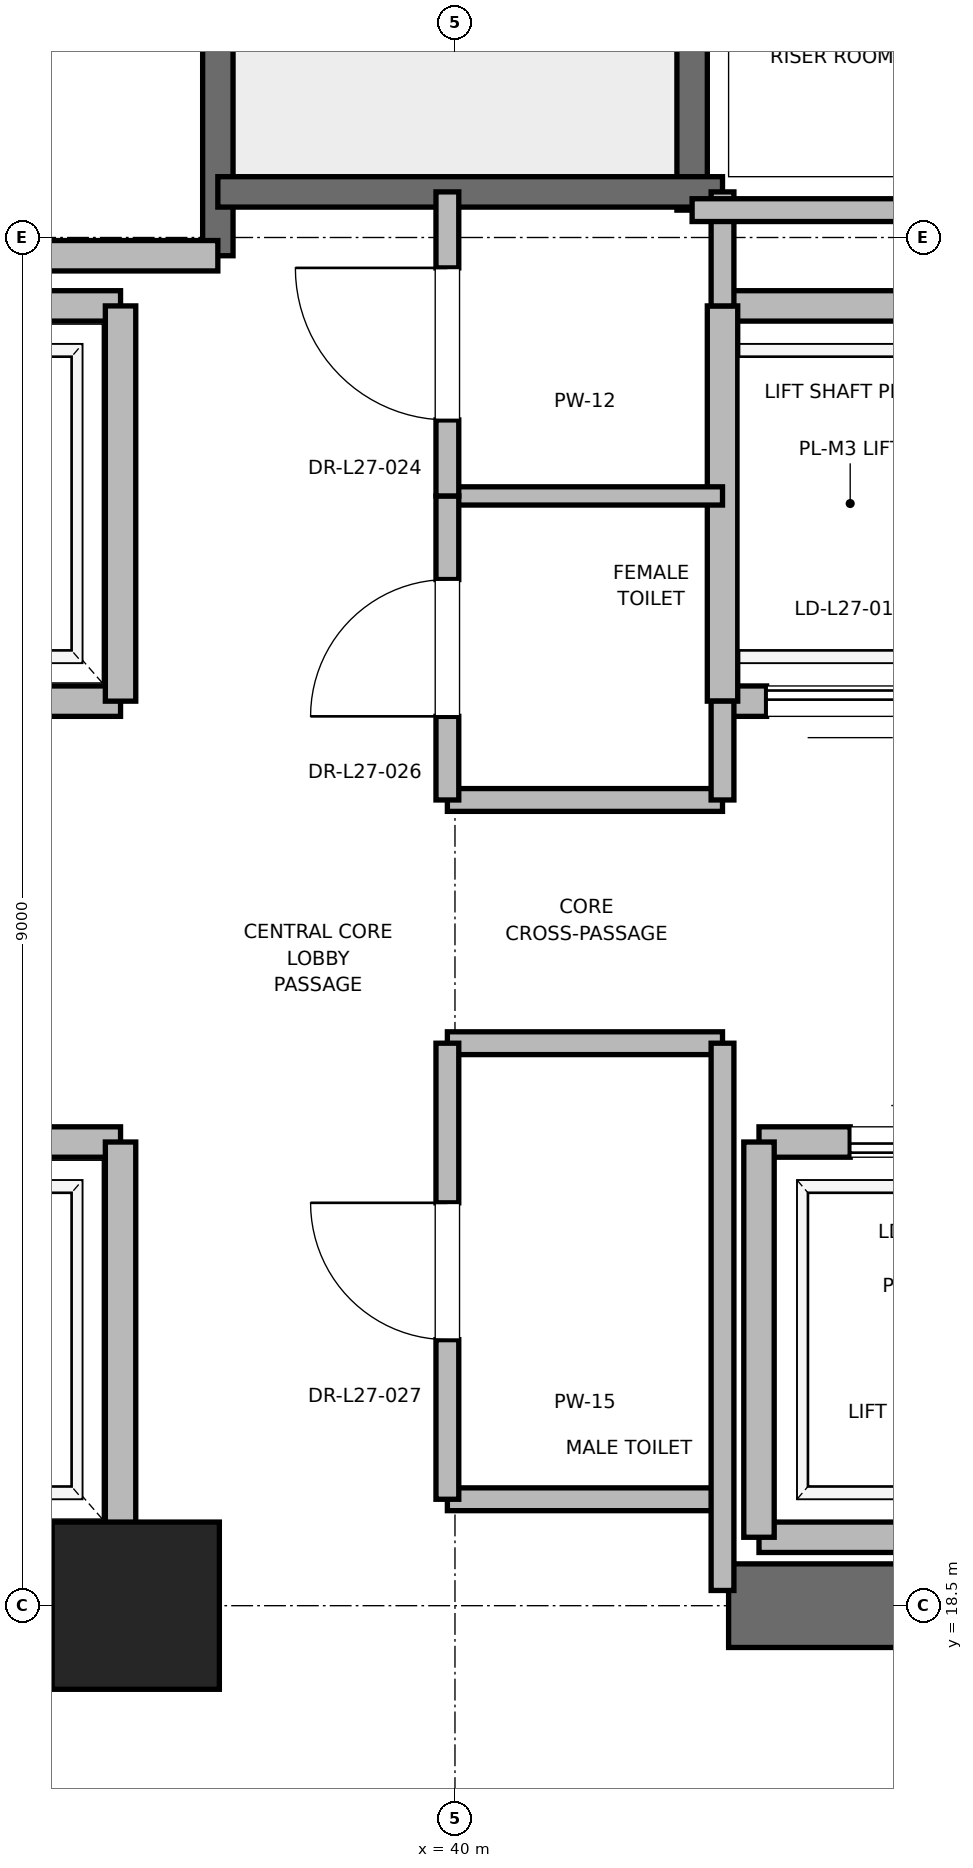
"""IFC4 building model, lengths in metres.
Left out: names, types, materials, properties, quantities, classifications, styles, units other than length and angle.
Written with IfcOpenShell. Run it as: python <this file> out.ifc"""

import sys

from ifc_helpers import new_model, si_unit, direction, frame, frame_2d, origin, origin_2d, place, context, subcontext, project, spatial, rectangle, extrude, element, fill, save


model = new_model("IFC4")
c1 = context("Model", 3, precision=1e-05, world=origin(), true_north=direction((0.0, 1.0)))
c2 = subcontext(c1, "Body", "Model", "MODEL_VIEW")
j1 = project(units=[si_unit("LENGTHUNIT", "METRE"), si_unit("PLANEANGLEUNIT", "RADIAN")], contexts=[c1])
p1 = place(None, origin())
s1 = spatial("IfcSite", under=j1, at=p1, CompositionType="ELEMENT")
p2 = place(p1, origin())
s2 = spatial("IfcBuilding", under=s1, at=p2, CompositionType="ELEMENT")
p3 = place(p2, frame((0.0, 0.0, 118.4)))
s3 = spatial("IfcBuildingStorey", under=s2, at=p3, CompositionType="ELEMENT", Elevation=118.4)
p4 = place(p3, frame((37.9, 18.5, 0.0), z_axis=(0.0, 0.0, 1.0), x_axis=(1.0, 0.0, 0.0)))
e1 = element("IfcColumn", 1, at=p4, inside=s3, PredefinedType="PILASTER", context=c2, shape_type="SweptSolid", body=[
    extrude(rectangle(XDim=1.1, YDim=1.1, at=origin_2d()), origin(), (0.0, 0.0, 1.0), 5.0),
])
for number, where, z_axis, x_axis in (
    (2, (29.0, 18.5, 0.0), (0.0, 0.0, 1.0), (1.0, 0.0, 0.0)),
    (3, (41.8, 18.5, 0.0), (0.0, 0.0, 1.0), (1.0, 0.0, 0.0)),
):
    element("IfcWall", number, at=place(p3, frame(where, z_axis=z_axis, x_axis=x_axis)), inside=s3, PredefinedType="SHEAR", context=c2, shape_type="SweptSolid", body=[
        extrude(rectangle(XDim=9.2, YDim=0.55, at=frame_2d((4.6, 0.0))), origin(), (0.0, 0.0, 1.0), 4.7),
    ])
p5 = place(p3, frame((38.44, 27.38, 0.0), z_axis=(0.0, 0.0, 1.0), x_axis=(0.0, 1.0, 0.0)))
e4 = element("IfcWall", 4, at=p5, inside=s3, PredefinedType="SOLIDWALL", context=c2, shape_type="SweptSolid", body=[
    extrude(rectangle(XDim=8.87, YDim=0.2, at=frame_2d((4.435, 0.0))), origin(), (0.0, 0.0, 1.0), 4.7),
])
p6 = place(p3, frame((41.56, 27.68, 0.0), z_axis=(0.0, 0.0, 1.0), x_axis=(0.0, 1.0, 0.0)))
e5 = element("IfcWall", 5, at=p6, inside=s3, PredefinedType="SOLIDWALL", context=c2, shape_type="SweptSolid", body=[
    extrude(rectangle(XDim=8.57, YDim=0.2, at=frame_2d((4.285, 0.0))), origin(), (0.0, 0.0, 1.0), 4.7),
])
p7 = place(p3, frame((38.44, 27.8, 0.0), z_axis=(0.0, 0.0, 1.0), x_axis=(1.0, 0.0, 0.0)))
e6 = element("IfcWall", 6, at=p7, inside=s3, PredefinedType="SOLIDWALL", context=c2, shape_type="SweptSolid", body=[
    extrude(rectangle(XDim=3.32, YDim=0.2, at=frame_2d((1.66, 0.0))), origin(), (0.0, 0.0, 1.0), 4.7),
])
p8 = place(p3, frame((32.82, 27.38, 0.0), z_axis=(0.0, 0.0, 1.0), x_axis=(1.0, 0.0, 0.0)))
e7 = element("IfcWall", 7, at=p8, inside=s3, PredefinedType="PARTITIONING", context=c2, shape_type="SweptSolid", body=[
    extrude(rectangle(XDim=5.62, YDim=0.2, at=frame_2d((2.81, 0.0))), origin(), (0.0, 0.0, 1.0), 4.7),
])
p9 = place(p3, frame((35.5, 18.95, 0.0), z_axis=(0.0, 0.0, 1.0), x_axis=(1.0, 0.0, 0.0)))
e8 = element("IfcWall", 8, at=p9, inside=s3, PredefinedType="SOLIDWALL", context=c2, shape_type="SweptSolid", body=[
    extrude(rectangle(XDim=2.3, YDim=0.2, at=frame_2d((1.15, 0.0))), origin(), (0.0, 0.0, 1.0), 3.68),
])
p10 = place(p3, frame((37.8, 21.55, 0.0), z_axis=(0.0, 0.0, 1.0), x_axis=(-1.0, 0.0, 0.0)))
e9 = element("IfcWall", 9, at=p10, inside=s3, PredefinedType="SOLIDWALL", context=c2, shape_type="SweptSolid", body=[
    extrude(rectangle(XDim=2.3, YDim=0.2, at=frame_2d((1.15, 0.0))), origin(), (0.0, 0.0, 1.0), 4.7),
])
p11 = place(p10, frame((0.6, 0.0, 0.0)))
e10 = element("IfcOpeningElement", 10, at=p11, cuts=e9, PredefinedType="OPENING", context=c2, shape_type="SweptSolid", body=[
    extrude(rectangle(XDim=1.1, YDim=2.2, at=frame_2d((0.55, 1.1))), frame((0.0, 0.1, 0.0), z_axis=(0.0, -1.0, 0.0), x_axis=(1.0, 0.0, 0.0)), (0.0, 0.0, 1.0), 0.2),
])
p12 = place(p3, frame((37.8, 18.95, 0.0), z_axis=(0.0, 0.0, 1.0), x_axis=(0.0, 1.0, 0.0)))
e11 = element("IfcWall", 11, at=p12, inside=s3, PredefinedType="SOLIDWALL", context=c2, shape_type="SweptSolid", body=[
    extrude(rectangle(XDim=2.6, YDim=0.2, at=frame_2d((1.3, 0.0))), origin(), (0.0, 0.0, 1.0), 3.68),
])
p13 = place(p3, frame((35.5, 24.45, 0.0), z_axis=(0.0, 0.0, 1.0), x_axis=(1.0, 0.0, 0.0)))
e12 = element("IfcWall", 12, at=p13, inside=s3, PredefinedType="SOLIDWALL", context=c2, shape_type="SweptSolid", body=[
    extrude(rectangle(XDim=2.3, YDim=0.2, at=frame_2d((1.15, 0.0))), origin(), (0.0, 0.0, 1.0), 4.7),
])
p14 = place(p13, frame((0.6, 0.0, 0.0)))
e13 = element("IfcOpeningElement", 13, at=p14, cuts=e12, PredefinedType="OPENING", context=c2, shape_type="SweptSolid", body=[
    extrude(rectangle(XDim=1.1, YDim=2.2, at=frame_2d((0.55, 1.1))), frame((0.0, 0.1, 0.0), z_axis=(0.0, -1.0, 0.0), x_axis=(1.0, 0.0, 0.0)), (0.0, 0.0, 1.0), 0.2),
])
p15 = place(p3, frame((37.8, 27.05, 0.0), z_axis=(0.0, 0.0, 1.0), x_axis=(-1.0, 0.0, 0.0)))
e14 = element("IfcWall", 14, at=p15, inside=s3, PredefinedType="SOLIDWALL", context=c2, shape_type="SweptSolid", body=[
    extrude(rectangle(XDim=2.3, YDim=0.2, at=frame_2d((1.15, 0.0))), origin(), (0.0, 0.0, 1.0), 4.7),
])
p16 = place(p3, frame((37.8, 24.45, 0.0), z_axis=(0.0, 0.0, 1.0), x_axis=(0.0, 1.0, 0.0)))
e15 = element("IfcWall", 15, at=p16, inside=s3, PredefinedType="SOLIDWALL", context=c2, shape_type="SweptSolid", body=[
    extrude(rectangle(XDim=2.6, YDim=0.2, at=frame_2d((1.3, 0.0))), origin(), (0.0, 0.0, 1.0), 4.7),
])
p17 = place(p3, frame((42.0, 18.95, 0.0), z_axis=(0.0, 0.0, 1.0), x_axis=(1.0, 0.0, 0.0)))
e16 = element("IfcWall", 16, at=p17, inside=s3, PredefinedType="SOLIDWALL", context=c2, shape_type="SweptSolid", body=[
    extrude(rectangle(XDim=2.3, YDim=0.2, at=frame_2d((1.15, 0.0))), origin(), (0.0, 0.0, 1.0), 3.68),
])
p18 = place(p3, frame((44.3, 21.55, 0.0), z_axis=(0.0, 0.0, 1.0), x_axis=(-1.0, 0.0, 0.0)))
e17 = element("IfcWall", 17, at=p18, inside=s3, PredefinedType="SOLIDWALL", context=c2, shape_type="SweptSolid", body=[
    extrude(rectangle(XDim=2.3, YDim=0.2, at=frame_2d((1.15, 0.0))), origin(), (0.0, 0.0, 1.0), 4.7),
])
p19 = place(p18, frame((0.6, 0.0, 0.0)))
e18 = element("IfcOpeningElement", 18, at=p19, cuts=e17, PredefinedType="OPENING", context=c2, shape_type="SweptSolid", body=[
    extrude(rectangle(XDim=1.1, YDim=2.2, at=frame_2d((0.55, 1.1))), frame((0.0, 0.1, 0.0), z_axis=(0.0, -1.0, 0.0), x_axis=(1.0, 0.0, 0.0)), (0.0, 0.0, 1.0), 0.2),
])
p20 = place(p3, frame((42.0, 21.55, 0.0), z_axis=(0.0, 0.0, 1.0), x_axis=(0.0, -1.0, 0.0)))
e19 = element("IfcWall", 19, at=p20, inside=s3, PredefinedType="SOLIDWALL", context=c2, shape_type="SweptSolid", body=[
    extrude(rectangle(XDim=2.6, YDim=0.2, at=frame_2d((1.3, 0.0))), origin(), (0.0, 0.0, 1.0), 3.68),
])
p21 = place(p3, frame((41.76, 24.45, 0.0), z_axis=(0.0, 0.0, 1.0), x_axis=(1.0, 0.0, 0.0)))
e20 = element("IfcWall", 20, at=p21, inside=s3, PredefinedType="SOLIDWALL", context=c2, shape_type="SweptSolid", body=[
    extrude(rectangle(XDim=1.68, YDim=0.2, at=frame_2d((0.84, 0.0))), origin(), (0.0, 0.0, 1.0), 4.7),
])
p22 = place(p21, frame((0.29, 0.0, 0.0)))
e21 = element("IfcOpeningElement", 21, at=p22, cuts=e20, PredefinedType="OPENING", context=c2, shape_type="SweptSolid", body=[
    extrude(rectangle(XDim=1.1, YDim=2.2, at=frame_2d((0.55, 1.1))), frame((0.0, 0.1, 0.0), z_axis=(0.0, -1.0, 0.0), x_axis=(1.0, 0.0, 0.0)), (0.0, 0.0, 1.0), 0.2),
])
p23 = place(p3, frame((43.44, 27.05, 0.0), z_axis=(0.0, 0.0, 1.0), x_axis=(-1.0, 0.0, 0.0)))
e22 = element("IfcWall", 22, at=p23, inside=s3, PredefinedType="SOLIDWALL", context=c2, shape_type="SweptSolid", body=[
    extrude(rectangle(XDim=1.68, YDim=0.2, at=frame_2d((0.84, 0.0))), origin(), (0.0, 0.0, 1.0), 4.7),
])
p24 = place(p3, frame((41.76, 27.05, 0.0), z_axis=(0.0, 0.0, 1.0), x_axis=(0.0, -1.0, 0.0)))
e23 = element("IfcWall", 23, at=p24, inside=s3, PredefinedType="SOLIDWALL", context=c2, shape_type="SweptSolid", body=[
    extrude(rectangle(XDim=2.6, YDim=0.2, at=frame_2d((1.3, 0.0))), origin(), (0.0, 0.0, 1.0), 4.7),
])
for number, where, z_axis, x_axis in (
    (24, (39.95, 19.2, 0.0), (0.0, 0.0, 1.0), (1.0, 0.0, 0.0)),
    (25, (39.95, 22.2, 0.0), (0.0, 0.0, 1.0), (1.0, 0.0, 0.0)),
    (26, (39.95, 23.8, 0.0), (0.0, 0.0, 1.0), (1.0, 0.0, 0.0)),
):
    element("IfcWall", number, at=place(p3, frame(where, z_axis=z_axis, x_axis=x_axis)), inside=s3, PredefinedType="PARTITIONING", context=c2, shape_type="SweptSolid", body=[
        extrude(rectangle(XDim=1.81, YDim=0.15, at=frame_2d((0.905, 0.0))), origin(), (0.0, 0.0, 1.0), 2.85),
    ])
p25 = place(p3, frame((39.95, 25.8, 0.0), z_axis=(0.0, 0.0, 1.0), x_axis=(1.0, 0.0, 0.0)))
e27 = element("IfcWall", 27, at=p25, inside=s3, PredefinedType="PARTITIONING", context=c2, shape_type="SweptSolid", body=[
    extrude(rectangle(XDim=1.81, YDim=0.12, at=frame_2d((0.905, 0.0))), origin(), (0.0, 0.0, 1.0), 2.85),
])
p26 = place(p3, frame((41.76, 18.6, 0.0), z_axis=(0.0, 0.0, 1.0), x_axis=(0.0, 1.0, 0.0)))
e28 = element("IfcWall", 28, at=p26, inside=s3, PredefinedType="PARTITIONING", context=c2, shape_type="SweptSolid", body=[
    extrude(rectangle(XDim=3.6, YDim=0.15, at=frame_2d((1.8, 0.0))), origin(), (0.0, 0.0, 1.0), 2.85),
])
p27 = place(p3, frame((41.76, 23.8, 0.0), z_axis=(0.0, 0.0, 1.0), x_axis=(0.0, 1.0, 0.0)))
e29 = element("IfcWall", 29, at=p27, inside=s3, PredefinedType="PARTITIONING", context=c2, shape_type="SweptSolid", body=[
    extrude(rectangle(XDim=0.65, YDim=0.15, at=frame_2d((0.325, 0.0))), origin(), (0.0, 0.0, 1.0), 2.85),
])
p28 = place(p3, frame((41.76, 27.05, 0.0), z_axis=(0.0, 0.0, 1.0), x_axis=(0.0, 1.0, 0.0)))
e30 = element("IfcWall", 30, at=p28, inside=s3, PredefinedType="PARTITIONING", context=c2, shape_type="SweptSolid", body=[
    extrude(rectangle(XDim=0.75, YDim=0.15, at=frame_2d((0.375, 0.0))), origin(), (0.0, 0.0, 1.0), 2.85),
])
p29 = place(p3, frame((39.95, 19.2, 0.0), z_axis=(0.0, 0.0, 1.0), x_axis=(0.0, 1.0, 0.0)))
e31 = element("IfcWall", 31, at=p29, inside=s3, PredefinedType="PARTITIONING", context=c2, shape_type="SweptSolid", body=[
    extrude(rectangle(XDim=3.0, YDim=0.15, at=frame_2d((1.5, 0.0))), origin(), (0.0, 0.0, 1.0), 2.85),
])
p30 = place(p29, frame((1.05, 0.0, 0.0)))
e32 = element("IfcOpeningElement", 32, at=p30, cuts=e31, PredefinedType="OPENING", context=c2, shape_type="SweptSolid", body=[
    extrude(rectangle(XDim=0.9, YDim=2.1, at=frame_2d((0.45, 1.05))), frame((0.0, 0.075, 0.0), z_axis=(0.0, -1.0, 0.0), x_axis=(1.0, 0.0, 0.0)), (0.0, 0.0, 1.0), 0.15),
])
p31 = place(p3, frame((39.95, 23.8, 0.0), z_axis=(0.0, 0.0, 1.0), x_axis=(0.0, 1.0, 0.0)))
e33 = element("IfcWall", 33, at=p31, inside=s3, PredefinedType="PARTITIONING", context=c2, shape_type="SweptSolid", body=[
    extrude(rectangle(XDim=2.0, YDim=0.15, at=frame_2d((1.0, 0.0))), origin(), (0.0, 0.0, 1.0), 2.85),
])
p32 = place(p31, frame((0.55, 0.0, 0.0)))
e34 = element("IfcOpeningElement", 34, at=p32, cuts=e33, PredefinedType="OPENING", context=c2, shape_type="SweptSolid", body=[
    extrude(rectangle(XDim=0.9, YDim=2.1, at=frame_2d((0.45, 1.05))), frame((0.0, 0.075, 0.0), z_axis=(0.0, -1.0, 0.0), x_axis=(1.0, 0.0, 0.0)), (0.0, 0.0, 1.0), 0.15),
])
p33 = place(p3, frame((39.95, 25.8, 0.0), z_axis=(0.0, 0.0, 1.0), x_axis=(0.0, 1.0, 0.0)))
e35 = element("IfcWall", 35, at=p33, inside=s3, PredefinedType="PARTITIONING", context=c2, shape_type="SweptSolid", body=[
    extrude(rectangle(XDim=2.0, YDim=0.15, at=frame_2d((1.0, 0.0))), origin(), (0.0, 0.0, 1.0), 2.85),
])
p34 = place(p33, frame((0.5, 0.0, 0.0)))
e36 = element("IfcOpeningElement", 36, at=p34, cuts=e35, PredefinedType="OPENING", context=c2, shape_type="SweptSolid", body=[
    extrude(rectangle(XDim=1.0, YDim=2.15, at=frame_2d((0.5, 1.075))), frame((0.0, 0.075, 0.0), z_axis=(0.0, -1.0, 0.0), x_axis=(1.0, 0.0, 0.0)), (0.0, 0.0, 1.0), 0.15),
])
p35 = place(p3, frame((41.56, 27.68, 0.0), z_axis=(0.0, 0.0, 1.0), x_axis=(1.0, 0.0, 0.0)))
e37 = element("IfcWall", 37, at=p35, inside=s3, PredefinedType="PARTITIONING", context=c2, shape_type="SweptSolid", body=[
    extrude(rectangle(XDim=3.59, YDim=0.15, at=frame_2d((1.795, 0.0))), origin(), (0.0, 0.0, 1.0), 2.85),
])
p36 = place(p19, origin())
e38 = element("IfcDoor", 38, at=p36, inside=s3, OperationType="SLIDING_TO_RIGHT", PredefinedType="DOOR", context=c2, shape_type="SweptSolid", body=[
    extrude(rectangle(XDim=1.1, YDim=2.2, at=frame_2d((0.55, 1.1))), frame((0.0, 0.025, 0.0), z_axis=(0.0, -1.0, 0.0), x_axis=(1.0, 0.0, 0.0)), (0.0, 0.0, 1.0), 0.05),
])
fill(e18, e38)
p37 = place(p22, origin())
e39 = element("IfcDoor", 39, at=p37, inside=s3, OperationType="SLIDING_TO_RIGHT", PredefinedType="DOOR", context=c2, shape_type="SweptSolid", body=[
    extrude(rectangle(XDim=1.1, YDim=2.2, at=frame_2d((0.55, 1.1))), frame((0.0, 0.025, 0.0), z_axis=(0.0, -1.0, 0.0), x_axis=(1.0, 0.0, 0.0)), (0.0, 0.0, 1.0), 0.05),
])
fill(e21, e39)
p38 = place(p30, origin())
e40 = element("IfcDoor", 40, at=p38, inside=s3, OperationType="SINGLE_SWING_RIGHT", PredefinedType="DOOR", context=c2, shape_type="SweptSolid", body=[
    extrude(rectangle(XDim=0.9, YDim=2.1, at=frame_2d((0.45, 1.05))), frame((0.0, 0.025, 0.0), z_axis=(0.0, -1.0, 0.0), x_axis=(1.0, 0.0, 0.0)), (0.0, 0.0, 1.0), 0.05),
])
fill(e32, e40)
p39 = place(p32, origin())
e41 = element("IfcDoor", 41, at=p39, inside=s3, OperationType="SINGLE_SWING_LEFT", PredefinedType="DOOR", context=c2, shape_type="SweptSolid", body=[
    extrude(rectangle(XDim=0.9, YDim=2.1, at=frame_2d((0.45, 1.05))), frame((0.0, 0.025, 0.0), z_axis=(0.0, -1.0, 0.0), x_axis=(1.0, 0.0, 0.0)), (0.0, 0.0, 1.0), 0.05),
])
fill(e34, e41)
p40 = place(p34, origin())
e42 = element("IfcDoor", 42, at=p40, inside=s3, OperationType="SINGLE_SWING_RIGHT", PredefinedType="DOOR", context=c2, shape_type="SweptSolid", body=[
    extrude(rectangle(XDim=1.0, YDim=2.15, at=frame_2d((0.5, 1.075))), frame((0.0, 0.025, 0.0), z_axis=(0.0, -1.0, 0.0), x_axis=(1.0, 0.0, 0.0)), (0.0, 0.0, 1.0), 0.05),
])
fill(e36, e42)
save(model, sys.argv[1])
